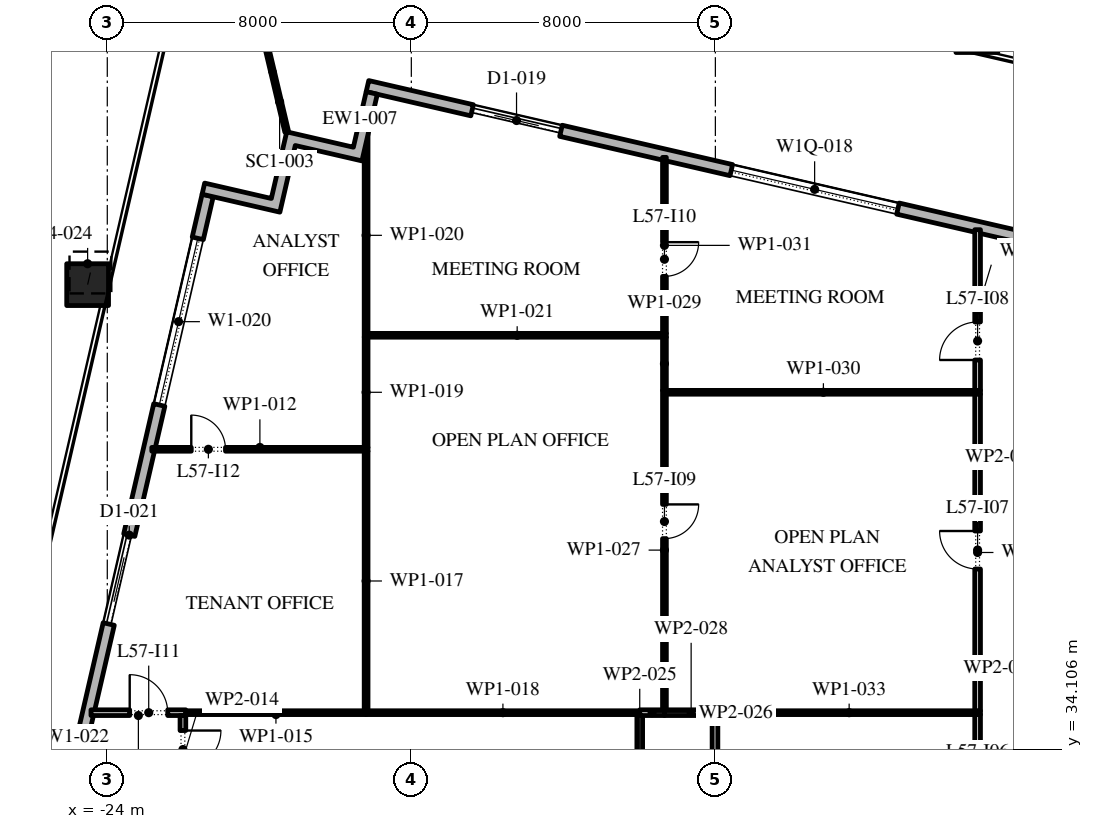
"""IFC4 building model, lengths in metres.
Left out: names, types, materials, properties, quantities, classifications, styles, units other than length and angle.
Written with IfcOpenShell. Run it as: python <this file> out.ifc"""

import sys

from ifc_helpers import new_model, si_unit, direction, frame, frame_2d, origin, origin_2d, place, context, subcontext, project, spatial, polyline, rectangle, outline, extrude, element, fill, save


model = new_model("IFC4")
c1 = context("Model", 3, precision=1e-05, world=origin(), true_north=direction((0.0, 1.0)))
c2 = subcontext(c1, "Body", "Model", "MODEL_VIEW")
j1 = project(units=[si_unit("LENGTHUNIT", "METRE"), si_unit("PLANEANGLEUNIT", "RADIAN")], contexts=[c1])
p1 = place(None, origin())
s1 = spatial("IfcSite", under=j1, at=p1, CompositionType="ELEMENT")
p2 = place(p1, origin())
s2 = spatial("IfcBuilding", under=s1, at=p2, CompositionType="ELEMENT")
p3 = place(p2, frame((0.0, 0.0, 264.0)))
s3 = spatial("IfcBuildingStorey", under=s2, at=p3, CompositionType="ELEMENT", Elevation=264.0)
p4 = place(p3, frame((-1.12, 52.99, 0.0), z_axis=(0.020377493232, 0.0882252832, 0.995892091129), x_axis=(-0.97434807649, 0.225046274885, 0.0)))
e1 = element("IfcColumn", 1, at=p4, inside=s3, PredefinedType="COLUMN", context=c2, shape_type="SweptSolid", body=[
    extrude(rectangle(XDim=1.1, YDim=1.1, at=origin_2d()), origin(), (0.0, 0.0, 1.0), 4.217),
])
p5 = place(p3, frame((-24.517, 46.333, 0.0), z_axis=(0.017444089556, 0.075687644385, 0.996978978829), x_axis=(-0.974454034257, 0.224587032398, 0.0)))
e2 = element("IfcColumn", 2, at=p5, inside=s3, PredefinedType="COLUMN", context=c2, shape_type="SweptSolid", body=[
    extrude(rectangle(XDim=1.1, YDim=1.1, at=origin_2d()), origin(), (0.0, 0.0, 1.0), 4.213),
])
p6 = place(p3, frame((29.616, 40.758, 0.0), z_axis=(0.0, 0.0, 1.0), x_axis=(-0.974370532314, 0.224949029246, 0.0)))
e3 = element("IfcWall", 3, at=p6, inside=s3, PredefinedType="STANDARD", context=c2, shape_type="SweptSolid", body=[
    extrude(rectangle(XDim=48.0, YDim=0.3, at=frame_2d((24.0, 0.0))), origin(), (0.0, 0.0, 1.0), 4.0),
])
p7 = place(p6, frame((1.625, 0.0, 0.45)))
e4 = element("IfcOpeningElement", 4, at=p7, cuts=e3, PredefinedType="OPENING", context=c2, shape_type="SweptSolid", body=[
    extrude(rectangle(XDim=4.5, YDim=2.575, at=frame_2d((2.25, 1.288))), frame((0.0, 0.16, 0.0), z_axis=(0.0, -1.0, 0.0), x_axis=(1.0, 0.0, 0.0)), (0.0, 0.0, 1.0), 0.32),
])
p8 = place(p6, frame((10.575, 0.0, 0.0)))
e5 = element("IfcOpeningElement", 5, at=p8, cuts=e3, PredefinedType="OPENING", context=c2, shape_type="SweptSolid", body=[
    extrude(rectangle(XDim=2.4, YDim=3.5, at=frame_2d((1.2, 1.75))), frame((0.0, 0.16, 0.0), z_axis=(0.0, -1.0, 0.0), x_axis=(1.0, 0.0, 0.0)), (0.0, 0.0, 1.0), 0.32),
])
p9 = place(p6, frame((17.575, 0.0, 0.45)))
e6 = element("IfcOpeningElement", 6, at=p9, cuts=e3, PredefinedType="OPENING", context=c2, shape_type="SweptSolid", body=[
    extrude(rectangle(XDim=4.5, YDim=2.45, at=frame_2d((2.25, 1.225))), frame((0.0, 0.16, 0.0), z_axis=(0.0, -1.0, 0.0), x_axis=(1.0, 0.0, 0.0)), (0.0, 0.0, 1.0), 0.32),
])
p10 = place(p6, frame((25.625, 0.0, 0.45)))
e7 = element("IfcOpeningElement", 7, at=p10, cuts=e3, PredefinedType="OPENING", context=c2, shape_type="SweptSolid", body=[
    extrude(rectangle(XDim=4.5, YDim=2.45, at=frame_2d((2.25, 1.225))), frame((0.0, 0.16, 0.0), z_axis=(0.0, -1.0, 0.0), x_axis=(1.0, 0.0, 0.0)), (0.0, 0.0, 1.0), 0.32),
])
p11 = place(p6, frame((33.675, 0.0, 0.45)))
e8 = element("IfcOpeningElement", 8, at=p11, cuts=e3, PredefinedType="OPENING", context=c2, shape_type="SweptSolid", body=[
    extrude(rectangle(XDim=4.5, YDim=2.45, at=frame_2d((2.25, 1.225))), frame((0.0, 0.16, 0.0), z_axis=(0.0, -1.0, 0.0), x_axis=(1.0, 0.0, 0.0)), (0.0, 0.0, 1.0), 0.32),
])
p12 = place(p6, frame((42.775, 0.0, 0.0)))
e9 = element("IfcOpeningElement", 9, at=p12, cuts=e3, PredefinedType="OPENING", context=c2, shape_type="SweptSolid", body=[
    extrude(rectangle(XDim=2.4, YDim=3.5, at=frame_2d((1.2, 1.75))), frame((0.0, 0.16, 0.0), z_axis=(0.0, -1.0, 0.0), x_axis=(1.0, 0.0, 0.0)), (0.0, 0.0, 1.0), 0.32),
])
p13 = place(p3, frame((-21.359, 48.678, 0.0), z_axis=(0.0, 0.0, 1.0), x_axis=(-0.224949198343, -0.974370493275, 0.0)))
e10 = element("IfcWall", 10, at=p13, inside=s3, PredefinedType="STANDARD", context=c2, shape_type="SweptSolid", body=[
    extrude(rectangle(XDim=49.5, YDim=0.3, at=frame_2d((24.75, 0.0))), origin(), (0.0, 0.0, 1.0), 4.0),
])
p14 = place(p13, frame((1.157, 0.0, 0.45)))
e11 = element("IfcOpeningElement", 11, at=p14, cuts=e10, PredefinedType="OPENING", context=c2, shape_type="SweptSolid", body=[
    extrude(rectangle(XDim=4.5, YDim=3.05, at=frame_2d((2.25, 1.525))), frame((0.0, 0.16, 0.0), z_axis=(0.0, -1.0, 0.0), x_axis=(1.0, 0.0, 0.0)), (0.0, 0.0, 1.0), 0.32),
])
p15 = place(p13, frame((9.171, 0.0, 0.0)))
e12 = element("IfcOpeningElement", 12, at=p15, cuts=e10, PredefinedType="OPENING", context=c2, shape_type="SweptSolid", body=[
    extrude(rectangle(XDim=2.4, YDim=3.5, at=frame_2d((1.2, 1.75))), frame((0.0, 0.16, 0.0), z_axis=(0.0, -1.0, 0.0), x_axis=(1.0, 0.0, 0.0)), (0.0, 0.0, 1.0), 0.32),
])
p16 = place(p13, frame((15.236, 0.0, 0.45)))
e13 = element("IfcOpeningElement", 13, at=p16, cuts=e10, PredefinedType="OPENING", context=c2, shape_type="SweptSolid", body=[
    extrude(rectangle(XDim=4.5, YDim=3.05, at=frame_2d((2.25, 1.525))), frame((0.0, 0.16, 0.0), z_axis=(0.0, -1.0, 0.0), x_axis=(1.0, 0.0, 0.0)), (0.0, 0.0, 1.0), 0.32),
])
p17 = place(p13, frame((22.35, 0.0, 0.45)))
e14 = element("IfcOpeningElement", 14, at=p17, cuts=e10, PredefinedType="OPENING", context=c2, shape_type="SweptSolid", body=[
    extrude(rectangle(XDim=4.5, YDim=3.05, at=frame_2d((2.25, 1.525))), frame((0.0, 0.16, 0.0), z_axis=(0.0, -1.0, 0.0), x_axis=(1.0, 0.0, 0.0)), (0.0, 0.0, 1.0), 0.32),
])
p18 = place(p13, frame((29.464, 0.0, 0.45)))
e15 = element("IfcOpeningElement", 15, at=p18, cuts=e10, PredefinedType="OPENING", context=c2, shape_type="SweptSolid", body=[
    extrude(rectangle(XDim=4.5, YDim=3.05, at=frame_2d((2.25, 1.525))), frame((0.0, 0.16, 0.0), z_axis=(0.0, -1.0, 0.0), x_axis=(1.0, 0.0, 0.0)), (0.0, 0.0, 1.0), 0.32),
])
p19 = place(p13, frame((37.628, 0.0, 0.0)))
e16 = element("IfcOpeningElement", 16, at=p19, cuts=e10, PredefinedType="OPENING", context=c2, shape_type="SweptSolid", body=[
    extrude(rectangle(XDim=2.4, YDim=3.325, at=frame_2d((1.2, 1.663))), frame((0.0, 0.16, 0.0), z_axis=(0.0, -1.0, 0.0), x_axis=(1.0, 0.0, 0.0)), (0.0, 0.0, 1.0), 0.32),
])
p20 = place(p13, frame((43.693, 0.0, 0.45)))
e17 = element("IfcOpeningElement", 17, at=p20, cuts=e10, PredefinedType="OPENING", context=c2, shape_type="SweptSolid", body=[
    extrude(rectangle(XDim=4.5, YDim=2.825, at=frame_2d((2.25, 1.413))), frame((0.0, 0.16, 0.0), z_axis=(0.0, -1.0, 0.0), x_axis=(1.0, 0.0, 0.0)), (0.0, 0.0, 1.0), 0.32),
])
p21 = place(p3, origin())
e18 = element("IfcWall", 18, at=p21, inside=s3, PredefinedType="STANDARD", context=c2, shape_type="SweptSolid", body=[
    extrude(outline(polyline([(-21.505, 48.712), (-21.438, 49.004), (-19.684, 48.599), (-19.279, 50.353), (-17.525, 49.948), (-17.188, 51.41), (-16.895, 51.342), (-17.3, 49.588), (-19.054, 49.993), (-19.459, 48.24), (-21.505, 48.712)])), origin(), (0.0, 0.0, 1.0), 4.0),
])
p22 = place(p3, frame((-19.279, 50.353, -0.05), z_axis=(0.0, 0.0, 1.0), x_axis=(-0.230061703828, 0.973176043906, 0.0)))
e19 = element("IfcWall", 19, at=p22, inside=s3, PredefinedType="STANDARD", context=c2, shape_type="SweptSolid", body=[
    extrude(rectangle(XDim=1.624, YDim=0.1, at=frame_2d((0.812, 0.0))), origin(), (0.0, 0.0, 1.0), 4.05),
])
p23 = place(p3, frame((-24.429, 35.07, 0.0), z_axis=(0.0, 0.0, 1.0), x_axis=(1.0, 0.0, 0.0)))
e20 = element("IfcWall", 20, at=p23, inside=s3, PredefinedType="PARTITIONING", context=c2, shape_type="SweptSolid", body=[
    extrude(rectangle(XDim=2.494, YDim=0.15, at=frame_2d((1.247, 0.0))), origin(), (0.0, 0.0, 1.0), 4.0),
])
p24 = place(p23, frame((1.019, 0.0, 0.0)))
e21 = element("IfcOpeningElement", 21, at=p24, cuts=e20, PredefinedType="OPENING", context=c2, shape_type="SweptSolid", body=[
    extrude(rectangle(XDim=1.0, YDim=2.1, at=frame_2d((0.5, 1.05))), frame((0.0, 0.085, 0.0), z_axis=(0.0, -1.0, 0.0), x_axis=(1.0, 0.0, 0.0)), (0.0, 0.0, 1.0), 0.17),
])
p25 = place(p3, frame((-22.829, 42.0, 0.0), z_axis=(0.0, 0.0, 1.0), x_axis=(1.0, 0.0, 0.0)))
e22 = element("IfcWall", 22, at=p25, inside=s3, PredefinedType="PARTITIONING", context=c2, shape_type="SweptSolid", body=[
    extrude(rectangle(XDim=5.689, YDim=0.1, at=frame_2d((2.845, 0.0))), origin(), (0.0, 0.0, 1.0), 4.0),
])
p26 = place(p25, frame((1.039, 0.0, 0.0)))
e23 = element("IfcOpeningElement", 23, at=p26, cuts=e22, PredefinedType="OPENING", context=c2, shape_type="SweptSolid", body=[
    extrude(rectangle(XDim=0.9, YDim=2.1, at=frame_2d((0.45, 1.05))), frame((0.0, 0.06, 0.0), z_axis=(0.0, -1.0, 0.0), x_axis=(1.0, 0.0, 0.0)), (0.0, 0.0, 1.0), 0.12),
])
p27 = place(p3, frame((-22.01, 34.995, 0.0), z_axis=(0.0, 0.0, 1.0), x_axis=(0.0, -1.0, 0.0)))
e24 = element("IfcWall", 24, at=p27, inside=s3, PredefinedType="PARTITIONING", context=c2, shape_type="SweptSolid", body=[
    extrude(rectangle(XDim=2.295, YDim=0.15, at=frame_2d((1.147, 0.0))), origin(), (0.0, 0.0, 1.0), 4.0),
])
p28 = place(p27, frame((0.395, 0.0, 0.0)))
e25 = element("IfcOpeningElement", 25, at=p28, cuts=e24, PredefinedType="OPENING", context=c2, shape_type="SweptSolid", body=[
    extrude(rectangle(XDim=1.0, YDim=2.1, at=frame_2d((0.5, 1.05))), frame((0.0, 0.085, 0.0), z_axis=(0.0, -1.0, 0.0), x_axis=(1.0, 0.0, 0.0)), (0.0, 0.0, 1.0), 0.17),
])
p29 = place(p3, frame((-21.935, 35.07, 0.0), z_axis=(0.0, 0.0, 1.0), x_axis=(1.0, 0.0, 0.0)))
e26 = element("IfcWall", 26, at=p29, inside=s3, PredefinedType="PARTITIONING", context=c2, shape_type="SweptSolid", body=[
    extrude(rectangle(XDim=4.745, YDim=0.1, at=frame_2d((2.373, 0.0))), origin(), (0.0, 0.0, 1.0), 4.0),
])
p30 = place(p3, frame((-17.19, 35.12, 0.0), z_axis=(0.0, 0.0, 1.0), x_axis=(0.0, 1.0, 0.0)))
e27 = element("IfcWall", 27, at=p30, inside=s3, PredefinedType="PARTITIONING", context=c2, shape_type="SweptSolid", body=[
    extrude(rectangle(XDim=6.83, YDim=0.1, at=frame_2d((3.415, 0.0))), origin(), (0.0, 0.0, 1.0), 4.0),
])
p31 = place(p3, frame((-17.19, 35.07, 0.0), z_axis=(0.0, 0.0, 1.0), x_axis=(1.0, 0.0, 0.0)))
e28 = element("IfcWall", 28, at=p31, inside=s3, PredefinedType="PARTITIONING", context=c2, shape_type="SweptSolid", body=[
    extrude(rectangle(XDim=7.2, YDim=0.1, at=frame_2d((3.6, 0.0))), origin(), (0.0, 0.0, 1.0), 4.0),
])
p32 = place(p3, frame((-17.19, 42.05, 0.0), z_axis=(0.0, 0.0, 1.0), x_axis=(0.0, 1.0, 0.0)))
e29 = element("IfcWall", 29, at=p32, inside=s3, PredefinedType="PARTITIONING", context=c2, shape_type="SweptSolid", body=[
    extrude(rectangle(XDim=2.9, YDim=0.1, at=frame_2d((1.45, 0.0))), origin(), (0.0, 0.0, 1.0), 4.0),
])
p33 = place(p3, frame((-17.19, 44.95, 0.0), z_axis=(0.0, 0.0, 1.0), x_axis=(0.0, 1.0, 0.0)))
e30 = element("IfcWall", 30, at=p33, inside=s3, PredefinedType="PARTITIONING", context=c2, shape_type="SweptSolid", body=[
    extrude(rectangle(XDim=5.36, YDim=0.1, at=frame_2d((2.68, 0.0))), origin(), (0.0, 0.0, 1.0), 4.0),
])
p34 = place(p3, frame((-17.14, 45.0, 0.0), z_axis=(0.0, 0.0, 1.0), x_axis=(1.0, 0.0, 0.0)))
e31 = element("IfcWall", 31, at=p34, inside=s3, PredefinedType="PARTITIONING", context=c2, shape_type="SweptSolid", body=[
    extrude(rectangle(XDim=7.85, YDim=0.1, at=frame_2d((3.925, 0.0))), origin(), (0.0, 0.0, 1.0), 4.0),
])
p35 = place(p3, frame((-9.99, 32.7, 0.0), z_axis=(0.0, 0.0, 1.0), x_axis=(0.0, 1.0, 0.0)))
e32 = element("IfcWall", 32, at=p35, inside=s3, PredefinedType="PARTITIONING", context=c2, shape_type="SweptSolid", body=[
    extrude(rectangle(XDim=2.32, YDim=0.15, at=frame_2d((1.16, 0.0))), origin(), (0.0, 0.0, 1.0), 4.0),
])
p36 = place(p3, frame((-9.99, 35.07, 0.0), z_axis=(0.0, 0.0, 1.0), x_axis=(1.0, 0.0, 0.0)))
e33 = element("IfcWall", 33, at=p36, inside=s3, PredefinedType="PARTITIONING", context=c2, shape_type="SweptSolid", body=[
    extrude(rectangle(XDim=0.65, YDim=0.15, at=frame_2d((0.325, 0.0))), origin(), (0.0, 0.0, 1.0), 4.0),
])
p37 = place(p3, frame((-9.34, 35.145, 0.0), z_axis=(0.0, 0.0, 1.0), x_axis=(0.0, 1.0, 0.0)))
e34 = element("IfcWall", 34, at=p37, inside=s3, PredefinedType="PARTITIONING", context=c2, shape_type="SweptSolid", body=[
    extrude(rectangle(XDim=8.405, YDim=0.1, at=frame_2d((4.203, 0.0))), origin(), (0.0, 0.0, 1.0), 4.0),
])
p38 = place(p37, frame((4.505, 0.0, 0.0)))
e35 = element("IfcOpeningElement", 35, at=p38, cuts=e34, PredefinedType="OPENING", context=c2, shape_type="SweptSolid", body=[
    extrude(rectangle(XDim=0.9, YDim=2.1, at=frame_2d((0.45, 1.05))), frame((0.0, 0.06, 0.0), z_axis=(0.0, -1.0, 0.0), x_axis=(1.0, 0.0, 0.0)), (0.0, 0.0, 1.0), 0.12),
])
p39 = place(p3, frame((-9.34, 35.07, 0.0), z_axis=(0.0, 0.0, 1.0), x_axis=(1.0, 0.0, 0.0)))
e36 = element("IfcWall", 36, at=p39, inside=s3, PredefinedType="PARTITIONING", context=c2, shape_type="SweptSolid", body=[
    extrude(rectangle(XDim=1.405, YDim=0.15, at=frame_2d((0.703, 0.0))), origin(), (0.0, 0.0, 1.0), 4.0),
])
p40 = place(p3, frame((-9.34, 43.55, 0.0), z_axis=(0.0, 0.0, 1.0), x_axis=(0.0, 1.0, 0.0)))
e37 = element("IfcWall", 37, at=p40, inside=s3, PredefinedType="PARTITIONING", context=c2, shape_type="SweptSolid", body=[
    extrude(rectangle(XDim=1.4, YDim=0.1, at=frame_2d((0.7, 0.0))), origin(), (0.0, 0.0, 1.0), 4.0),
])
p41 = place(p3, frame((-9.29, 43.5, 0.0), z_axis=(0.0, 0.0, 1.0), x_axis=(1.0, 0.0, 0.0)))
e38 = element("IfcWall", 38, at=p41, inside=s3, PredefinedType="PARTITIONING", context=c2, shape_type="SweptSolid", body=[
    extrude(rectangle(XDim=8.265, YDim=0.1, at=frame_2d((4.133, 0.0))), origin(), (0.0, 0.0, 1.0), 4.0),
])
p42 = place(p3, frame((-9.34, 45.05, 0.0), z_axis=(0.0, 0.0, 1.0), x_axis=(0.0, 1.0, 0.0)))
e39 = element("IfcWall", 39, at=p42, inside=s3, PredefinedType="PARTITIONING", context=c2, shape_type="SweptSolid", body=[
    extrude(rectangle(XDim=4.631, YDim=0.1, at=frame_2d((2.315, 0.0))), origin(), (0.0, 0.0, 1.0), 4.0),
])
p43 = place(p42, frame((1.5, 0.0, 0.0)))
e40 = element("IfcOpeningElement", 40, at=p43, cuts=e39, PredefinedType="OPENING", context=c2, shape_type="SweptSolid", body=[
    extrude(rectangle(XDim=0.9, YDim=2.1, at=frame_2d((0.45, 1.05))), frame((0.0, 0.06, 0.0), z_axis=(0.0, -1.0, 0.0), x_axis=(1.0, 0.0, 0.0)), (0.0, 0.0, 1.0), 0.12),
])
p44 = place(p3, frame((-8.01, 34.995, 0.0), z_axis=(0.0, 0.0, 1.0), x_axis=(0.0, -1.0, 0.0)))
e41 = element("IfcWall", 41, at=p44, inside=s3, PredefinedType="PARTITIONING", context=c2, shape_type="SweptSolid", body=[
    extrude(rectangle(XDim=2.295, YDim=0.15, at=frame_2d((1.147, 0.0))), origin(), (0.0, 0.0, 1.0), 4.0),
])
p45 = place(p3, frame((-7.935, 35.07, 0.0), z_axis=(0.0, 0.0, 1.0), x_axis=(1.0, 0.0, 0.0)))
e42 = element("IfcWall", 42, at=p45, inside=s3, PredefinedType="PARTITIONING", context=c2, shape_type="SweptSolid", body=[
    extrude(rectangle(XDim=6.91, YDim=0.1, at=frame_2d((3.455, 0.0))), origin(), (0.0, 0.0, 1.0), 4.0),
])
p46 = place(p3, frame((-1.1, 28.19, 0.0), z_axis=(0.0, 0.0, 1.0), x_axis=(0.0, 1.0, 0.0)))
e43 = element("IfcWall", 43, at=p46, inside=s3, PredefinedType="PARTITIONING", context=c2, shape_type="SweptSolid", body=[
    extrude(rectangle(XDim=6.83, YDim=0.15, at=frame_2d((3.415, 0.0))), origin(), (0.0, 0.0, 1.0), 4.0),
])
p47 = place(p46, frame((4.23, 0.0, 0.0)))
e44 = element("IfcOpeningElement", 44, at=p47, cuts=e43, PredefinedType="OPENING", context=c2, shape_type="SweptSolid", body=[
    extrude(rectangle(XDim=1.0, YDim=2.1, at=frame_2d((0.5, 1.05))), frame((0.0, 0.085, 0.0), z_axis=(0.0, -1.0, 0.0), x_axis=(1.0, 0.0, 0.0)), (0.0, 0.0, 1.0), 0.17),
])
p48 = place(p3, frame((-1.1, 35.12, 0.0), z_axis=(0.0, 0.0, 1.0), x_axis=(0.0, 1.0, 0.0)))
e45 = element("IfcWall", 45, at=p48, inside=s3, PredefinedType="PARTITIONING", context=c2, shape_type="SweptSolid", body=[
    extrude(rectangle(XDim=8.33, YDim=0.15, at=frame_2d((4.165, 0.0))), origin(), (0.0, 0.0, 1.0), 4.0),
])
p49 = place(p48, frame((3.73, 0.0, 0.0)))
e46 = element("IfcOpeningElement", 46, at=p49, cuts=e45, PredefinedType="OPENING", context=c2, shape_type="SweptSolid", body=[
    extrude(rectangle(XDim=1.0, YDim=2.1, at=frame_2d((0.5, 1.05))), frame((0.0, 0.085, 0.0), z_axis=(0.0, -1.0, 0.0), x_axis=(1.0, 0.0, 0.0)), (0.0, 0.0, 1.0), 0.17),
])
p50 = place(p3, frame((-1.1, 43.55, 0.0), z_axis=(0.0, 0.0, 1.0), x_axis=(0.0, 1.0, 0.0)))
e47 = element("IfcWall", 47, at=p50, inside=s3, PredefinedType="PARTITIONING", context=c2, shape_type="SweptSolid", body=[
    extrude(rectangle(XDim=4.228, YDim=0.15, at=frame_2d((2.114, 0.0))), origin(), (0.0, 0.0, 1.0), 4.0),
])
p51 = place(p50, frame((0.8, 0.0, 0.0)))
e48 = element("IfcOpeningElement", 48, at=p51, cuts=e47, PredefinedType="OPENING", context=c2, shape_type="SweptSolid", body=[
    extrude(rectangle(XDim=1.0, YDim=2.1, at=frame_2d((0.5, 1.05))), frame((0.0, 0.085, 0.0), z_axis=(0.0, -1.0, 0.0), x_axis=(1.0, 0.0, 0.0)), (0.0, 0.0, 1.0), 0.17),
])
p52 = place(p3, frame((-19.652, 51.933, -0.05), z_axis=(0.0, 0.0, 1.0), x_axis=(-0.230237317932, 0.973134511479, 0.0)))
e49 = element("IfcWall", 49, at=p52, inside=s3, PredefinedType="STANDARD", context=c2, shape_type="SweptSolid", body=[
    extrude(rectangle(XDim=1.726, YDim=0.1, at=frame_2d((0.863, 0.0))), origin(), (0.0, 0.0, 1.0), 3.07),
])
p53 = place(p11, origin())
e50 = element("IfcWindow", 50, at=p53, inside=s3, PartitioningType="DOUBLE_PANEL_VERTICAL", PredefinedType="WINDOW", context=c2, shape_type="SweptSolid", body=[
    extrude(rectangle(XDim=4.5, YDim=2.45, at=frame_2d((2.25, 1.225))), frame((0.0, 0.03, 0.0), z_axis=(0.0, -1.0, 0.0), x_axis=(1.0, 0.0, 0.0)), (0.0, 0.0, 1.0), 0.06),
])
fill(e8, e50)
p54 = place(p12, origin())
e51 = element("IfcDoor", 51, at=p54, inside=s3, OperationType="DOUBLE_DOOR_SLIDING", PredefinedType="DOOR", context=c2, shape_type="SweptSolid", body=[
    extrude(rectangle(XDim=2.4, YDim=3.5, at=frame_2d((1.2, 1.75))), frame((0.0, 0.025, 0.0), z_axis=(0.0, -1.0, 0.0), x_axis=(1.0, 0.0, 0.0)), (0.0, 0.0, 1.0), 0.05),
])
fill(e9, e51)
p55 = place(p14, origin())
e52 = element("IfcWindow", 52, at=p55, inside=s3, PartitioningType="DOUBLE_PANEL_VERTICAL", PredefinedType="WINDOW", context=c2, shape_type="SweptSolid", body=[
    extrude(rectangle(XDim=4.5, YDim=3.05, at=frame_2d((2.25, 1.525))), frame((0.0, 0.03, 0.0), z_axis=(0.0, -1.0, 0.0), x_axis=(1.0, 0.0, 0.0)), (0.0, 0.0, 1.0), 0.06),
])
fill(e11, e52)
p56 = place(p15, origin())
e53 = element("IfcDoor", 53, at=p56, inside=s3, OperationType="DOUBLE_DOOR_SLIDING", PredefinedType="DOOR", context=c2, shape_type="SweptSolid", body=[
    extrude(rectangle(XDim=2.4, YDim=3.5, at=frame_2d((1.2, 1.75))), frame((0.0, 0.025, 0.0), z_axis=(0.0, -1.0, 0.0), x_axis=(1.0, 0.0, 0.0)), (0.0, 0.0, 1.0), 0.05),
])
fill(e12, e53)
p57 = place(p28, origin())
e54 = element("IfcDoor", 54, at=p57, inside=s3, OperationType="SINGLE_SWING_RIGHT", PredefinedType="DOOR", context=c2, shape_type="SweptSolid", body=[
    extrude(rectangle(XDim=1.0, YDim=2.1, at=frame_2d((0.5, 1.05))), frame((0.0, 0.025, 0.0), z_axis=(0.0, -1.0, 0.0), x_axis=(1.0, 0.0, 0.0)), (0.0, 0.0, 1.0), 0.05),
])
fill(e25, e54)
p58 = place(p49, origin())
e55 = element("IfcDoor", 55, at=p58, inside=s3, OperationType="SINGLE_SWING_LEFT", PredefinedType="DOOR", context=c2, shape_type="SweptSolid", body=[
    extrude(rectangle(XDim=1.0, YDim=2.1, at=frame_2d((0.5, 1.05))), frame((0.0, 0.025, 0.0), z_axis=(0.0, -1.0, 0.0), x_axis=(1.0, 0.0, 0.0)), (0.0, 0.0, 1.0), 0.05),
])
fill(e46, e55)
p59 = place(p51, origin())
e56 = element("IfcDoor", 56, at=p59, inside=s3, OperationType="SINGLE_SWING_RIGHT", PredefinedType="DOOR", context=c2, shape_type="SweptSolid", body=[
    extrude(rectangle(XDim=1.0, YDim=2.1, at=frame_2d((0.5, 1.05))), frame((0.0, 0.025, 0.0), z_axis=(0.0, -1.0, 0.0), x_axis=(1.0, 0.0, 0.0)), (0.0, 0.0, 1.0), 0.05),
])
fill(e48, e56)
p60 = place(p38, frame((0.9, 0.0, 0.0), z_axis=(0.0, 0.0, 1.0), x_axis=(-1.0, 0.0, 0.0)))
e57 = element("IfcDoor", 57, at=p60, inside=s3, OperationType="SINGLE_SWING_RIGHT", PredefinedType="DOOR", context=c2, shape_type="SweptSolid", body=[
    extrude(rectangle(XDim=0.9, YDim=2.1, at=frame_2d((0.45, 1.05))), frame((0.0, 0.025, 0.0), z_axis=(0.0, -1.0, 0.0), x_axis=(1.0, 0.0, 0.0)), (0.0, 0.0, 1.0), 0.05),
])
fill(e35, e57)
p61 = place(p43, frame((0.9, 0.0, 0.0), z_axis=(0.0, 0.0, 1.0), x_axis=(-1.0, 0.0, 0.0)))
e58 = element("IfcDoor", 58, at=p61, inside=s3, OperationType="SINGLE_SWING_RIGHT", PredefinedType="DOOR", context=c2, shape_type="SweptSolid", body=[
    extrude(rectangle(XDim=0.9, YDim=2.1, at=frame_2d((0.45, 1.05))), frame((0.0, 0.025, 0.0), z_axis=(0.0, -1.0, 0.0), x_axis=(1.0, 0.0, 0.0)), (0.0, 0.0, 1.0), 0.05),
])
fill(e40, e58)
p62 = place(p24, origin())
e59 = element("IfcDoor", 59, at=p62, inside=s3, OperationType="SINGLE_SWING_RIGHT", PredefinedType="DOOR", context=c2, shape_type="SweptSolid", body=[
    extrude(rectangle(XDim=1.0, YDim=2.1, at=frame_2d((0.5, 1.05))), frame((0.0, 0.025, 0.0), z_axis=(0.0, -1.0, 0.0), x_axis=(1.0, 0.0, 0.0)), (0.0, 0.0, 1.0), 0.05),
])
fill(e21, e59)
p63 = place(p26, origin())
e60 = element("IfcDoor", 60, at=p63, inside=s3, OperationType="SINGLE_SWING_RIGHT", PredefinedType="DOOR", context=c2, shape_type="SweptSolid", body=[
    extrude(rectangle(XDim=0.9, YDim=2.1, at=frame_2d((0.45, 1.05))), frame((0.0, 0.025, 0.0), z_axis=(0.0, -1.0, 0.0), x_axis=(1.0, 0.0, 0.0)), (0.0, 0.0, 1.0), 0.05),
])
fill(e23, e60)
save(model, sys.argv[1])
